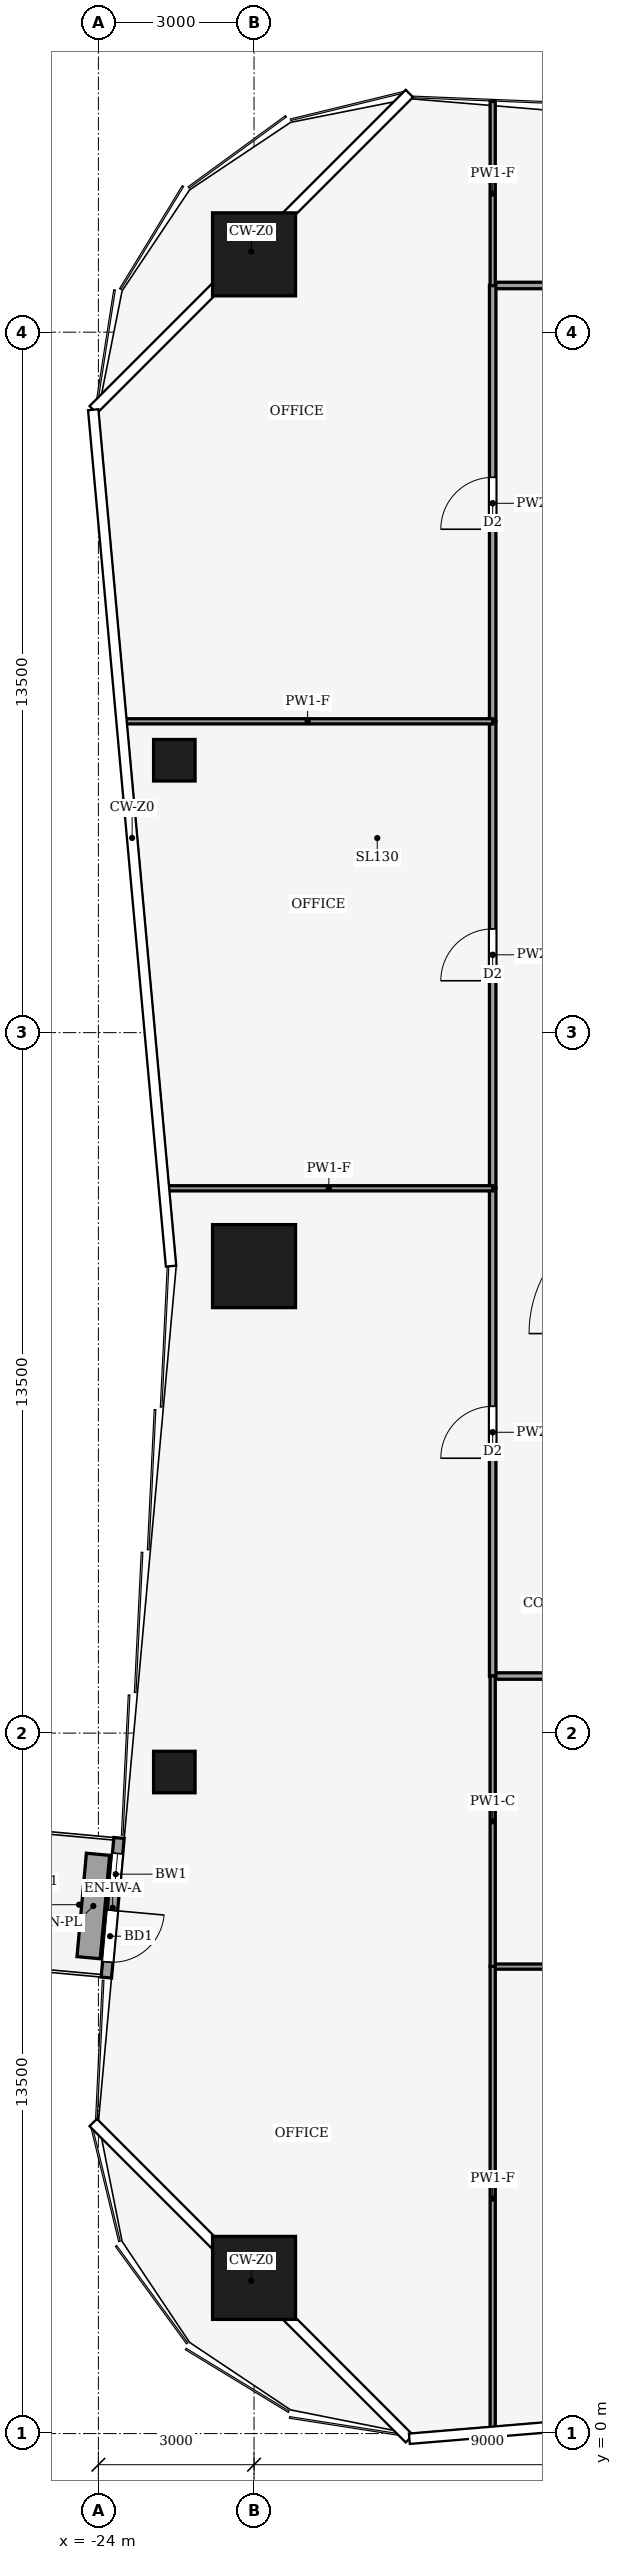
"""IFC4 building model, lengths in metres.
Left out: names, types, materials, properties, quantities, classifications, styles, units other than length and angle.
Written with IfcOpenShell. Run it as: python <this file> out.ifc"""

import sys

from ifc_helpers import new_model, si_unit, direction, frame, frame_2d, origin, origin_2d, place, context, subcontext, project, spatial, rectangle, hollow_rectangle, extrude, element, fill, save


model = new_model("IFC4")
c1 = context("Model", 3, precision=1e-05, world=origin(), true_north=direction((0.0, 1.0)))
c2 = subcontext(c1, "Body", "Model", "MODEL_VIEW")
j1 = project(units=[si_unit("LENGTHUNIT", "METRE"), si_unit("PLANEANGLEUNIT", "RADIAN")], contexts=[c1])
p1 = place(None, origin())
s1 = spatial("IfcSite", under=j1, at=p1, CompositionType="ELEMENT")
p2 = place(p1, origin())
s2 = spatial("IfcBuilding", under=s1, at=p2, CompositionType="ELEMENT")
p3 = place(p2, frame((0.0, 0.0, 46.0)))
s3 = spatial("IfcBuildingStorey", under=s2, at=p3, CompositionType="ELEMENT", Elevation=46.0)
for number, where, z_axis, x_axis in (
    (1, (-21.0, 42.0, 0.0), (0.0, 0.0, 1.0), (1.0, 0.0, 0.0)),
    (2, (-21.0, 3.0, 0.0), (0.0, 0.0, 1.0), (1.0, 0.0, 0.0)),
    (3, (-21.0, 22.5, 0.0), (0.0, 0.0, 1.0), (1.0, 0.0, 0.0)),
):
    element("IfcColumn", number, at=place(p3, frame(where, z_axis=z_axis, x_axis=x_axis)), inside=s3, PredefinedType="COLUMN", context=c2, shape_type="SweptSolid", body=[
        extrude(hollow_rectangle(XDim=1.6, YDim=1.6, WallThickness=0.09, at=origin_2d()), origin(), (0.0, 0.0, 1.0), 4.0),
    ])
for number, where, z_axis, x_axis in (
    (4, (-22.536, 12.75, 0.0), (0.0, 0.0, 1.0), (1.0, 0.0, 0.0)),
    (5, (-22.536, 32.25, 0.0), (0.0, 0.0, 1.0), (1.0, 0.0, 0.0)),
):
    element("IfcColumn", number, at=place(p3, frame(where, z_axis=z_axis, x_axis=x_axis)), inside=s3, PredefinedType="COLUMN", context=c2, shape_type="SweptSolid", body=[
        extrude(hollow_rectangle(XDim=0.8, YDim=0.8, WallThickness=0.04, at=origin_2d()), origin(), (0.0, 0.0, 1.0), 4.0),
    ])
p4 = place(p3, frame((-23.602, 11.479, 0.0), z_axis=(0.0, 0.0, 1.0), x_axis=(-0.090552042494, -0.995891724838, 0.0)))
e6 = element("IfcWall", 6, at=p4, inside=s3, PredefinedType="SOLIDWALL", context=c2, shape_type="SweptSolid", body=[
    extrude(rectangle(XDim=2.701, YDim=0.2, at=frame_2d((1.351, 0.0))), origin(), (0.0, 0.0, 1.0), 3.65),
])
p5 = place(p4, frame((1.401, 0.0, 0.0)))
e7 = element("IfcOpeningElement", 7, at=p5, cuts=e6, PredefinedType="OPENING", context=c2, shape_type="SweptSolid", body=[
    extrude(rectangle(XDim=1.0, YDim=2.1, at=frame_2d((0.5, 1.05))), frame((0.0, 0.11, 0.0), z_axis=(0.0, -1.0, 0.0), x_axis=(1.0, 0.0, 0.0)), (0.0, 0.0, 1.0), 0.22),
])
p6 = place(p4, frame((0.3, 0.0, 0.9)))
e8 = element("IfcOpeningElement", 8, at=p6, cuts=e6, PredefinedType="OPENING", context=c2, shape_type="SweptSolid", body=[
    extrude(rectangle(XDim=0.8, YDim=1.2, at=frame_2d((0.4, 0.6))), frame((0.0, 0.11, 0.0), z_axis=(0.0, -1.0, 0.0), x_axis=(1.0, 0.0, 0.0)), (0.0, 0.0, 1.0), 0.22),
])
p7 = place(p3, frame((-24.008, 11.165, 0.0), z_axis=(0.0, 0.0, 1.0), x_axis=(-0.090513748512, -0.995895205998, 0.0)))
e9 = element("IfcWall", 9, at=p7, inside=s3, PredefinedType="USERDEFINED", context=c2, shape_type="SweptSolid", body=[
    extrude(rectangle(XDim=2.001, YDim=0.45, at=frame_2d((1.001, 0.0))), origin(), (0.0, 0.0, 1.0), 0.4),
])
p8 = place(p3, frame((-9.0, 14.6, 0.0), z_axis=(0.0, 0.0, 1.0), x_axis=(-1.0, 0.0, 0.0)))
e10 = element("IfcWall", 10, at=p8, inside=s3, PredefinedType="PARTITIONING", context=c2, shape_type="SweptSolid", body=[
    extrude(rectangle(XDim=7.4, YDim=0.125, at=frame_2d((3.7, 0.0))), origin(), (0.0, 0.0, 1.0), 3.29),
])
p9 = place(p8, frame((3.2, 0.0, 0.0)))
e11 = element("IfcOpeningElement", 11, at=p9, cuts=e10, PredefinedType="OPENING", context=c2, shape_type="SweptSolid", body=[
    extrude(rectangle(XDim=1.0, YDim=2.1, at=frame_2d((0.5, 1.05))), frame((0.0, 0.073, 0.0), z_axis=(0.0, -1.0, 0.0), x_axis=(1.0, 0.0, 0.0)), (0.0, 0.0, 1.0), 0.145),
])
p10 = place(p3, frame((-16.4, 41.4, 0.0), z_axis=(0.0, 0.0, 1.0), x_axis=(1.0, 0.0, 0.0)))
e12 = element("IfcWall", 12, at=p10, inside=s3, PredefinedType="PARTITIONING", context=c2, shape_type="SweptSolid", body=[
    extrude(rectangle(XDim=10.4, YDim=0.125, at=frame_2d((5.2, 0.0))), origin(), (0.0, 0.0, 1.0), 3.54),
])
p11 = place(p10, frame((7.5, 0.0, 0.0)))
e13 = element("IfcOpeningElement", 13, at=p11, cuts=e12, PredefinedType="OPENING", context=c2, shape_type="SweptSolid", body=[
    extrude(rectangle(XDim=1.0, YDim=2.1, at=frame_2d((0.5, 1.05))), frame((0.0, 0.073, 0.0), z_axis=(0.0, -1.0, 0.0), x_axis=(1.0, 0.0, 0.0)), (0.0, 0.0, 1.0), 0.145),
])
p12 = place(p3, frame((-16.4, 14.596, 0.0), z_axis=(0.0, 0.0, 1.0), x_axis=(0.0, 1.0, 0.0)))
e14 = element("IfcWall", 14, at=p12, inside=s3, PredefinedType="PARTITIONING", context=c2, shape_type="SweptSolid", body=[
    extrude(rectangle(XDim=9.404, YDim=0.125, at=frame_2d((4.702, 0.0))), origin(), (0.0, 0.0, 1.0), 3.14),
])
p13 = place(p12, frame((4.202, 0.0, 0.0)))
e15 = element("IfcOpeningElement", 15, at=p13, cuts=e14, PredefinedType="OPENING", context=c2, shape_type="SweptSolid", body=[
    extrude(rectangle(XDim=1.0, YDim=2.1, at=frame_2d((0.5, 1.05))), frame((0.0, 0.073, 0.0), z_axis=(0.0, -1.0, 0.0), x_axis=(1.0, 0.0, 0.0)), (0.0, 0.0, 1.0), 0.145),
])
p14 = place(p3, frame((-16.4, 24.0, 0.0), z_axis=(0.0, 0.0, 1.0), x_axis=(0.0, 1.0, 0.0)))
e16 = element("IfcWall", 16, at=p14, inside=s3, PredefinedType="PARTITIONING", context=c2, shape_type="SweptSolid", body=[
    extrude(rectangle(XDim=9.0, YDim=0.125, at=frame_2d((4.5, 0.0))), origin(), (0.0, 0.0, 1.0), 3.48),
])
p15 = place(p14, frame((4.0, 0.0, 0.0)))
e17 = element("IfcOpeningElement", 17, at=p15, cuts=e16, PredefinedType="OPENING", context=c2, shape_type="SweptSolid", body=[
    extrude(rectangle(XDim=1.0, YDim=2.1, at=frame_2d((0.5, 1.05))), frame((0.0, 0.073, 0.0), z_axis=(0.0, -1.0, 0.0), x_axis=(1.0, 0.0, 0.0)), (0.0, 0.0, 1.0), 0.145),
])
p16 = place(p3, frame((-16.4, 33.0, 0.0), z_axis=(0.0, 0.0, 1.0), x_axis=(0.0, 1.0, 0.0)))
e18 = element("IfcWall", 18, at=p16, inside=s3, PredefinedType="PARTITIONING", context=c2, shape_type="SweptSolid", body=[
    extrude(rectangle(XDim=8.404, YDim=0.125, at=frame_2d((4.202, 0.0))), origin(), (0.0, 0.0, 1.0), 3.14),
])
p17 = place(p16, frame((3.702, 0.0, 0.0)))
e19 = element("IfcOpeningElement", 19, at=p17, cuts=e18, PredefinedType="OPENING", context=c2, shape_type="SweptSolid", body=[
    extrude(rectangle(XDim=1.0, YDim=2.1, at=frame_2d((0.5, 1.05))), frame((0.0, 0.073, 0.0), z_axis=(0.0, -1.0, 0.0), x_axis=(1.0, 0.0, 0.0)), (0.0, 0.0, 1.0), 0.145),
])
p18 = place(p3, frame((-8.996, 9.0, 0.0), z_axis=(0.0, 0.0, 1.0), x_axis=(-1.0, 0.0, 0.0)))
e20 = element("IfcWall", 20, at=p18, inside=s3, PredefinedType="PARTITIONING", context=c2, shape_type="SweptSolid", body=[
    extrude(rectangle(XDim=7.404, YDim=0.1, at=frame_2d((3.702, 0.0))), origin(), (0.0, 0.0, 1.0), 3.29),
])
p19 = place(p18, frame((3.202, 0.0, 0.0)))
e21 = element("IfcOpeningElement", 21, at=p19, cuts=e20, PredefinedType="OPENING", context=c2, shape_type="SweptSolid", body=[
    extrude(rectangle(XDim=1.0, YDim=2.1, at=frame_2d((0.5, 1.05))), frame((0.0, 0.06, 0.0), z_axis=(0.0, -1.0, 0.0), x_axis=(1.0, 0.0, 0.0)), (0.0, 0.0, 1.0), 0.12),
])
p20 = place(p3, frame((-16.4, 14.604, 0.0), z_axis=(0.0, 0.0, 1.0), x_axis=(0.0, -1.0, 0.0)))
e22 = element("IfcWall", 22, at=p20, inside=s3, PredefinedType="PARTITIONING", context=c2, shape_type="SweptSolid", body=[
    extrude(rectangle(XDim=5.608, YDim=0.1, at=frame_2d((2.804, 0.0))), origin(), (0.0, 0.0, 1.0), 3.87),
])
p21 = place(p3, frame((-16.4, 9.004, 0.0), z_axis=(0.0, 0.0, 1.0), x_axis=(0.0, -1.0, 0.0)))
e23 = element("IfcWall", 23, at=p21, inside=s3, PredefinedType="PARTITIONING", context=c2, shape_type="SweptSolid", body=[
    extrude(rectangle(XDim=8.951, YDim=0.1, at=frame_2d((4.475, 0.0))), origin(), (0.0, 0.0, 1.0), 3.04),
])
p22 = place(p3, frame((-16.4, 44.947, 0.0), z_axis=(0.0, 0.0, 1.0), x_axis=(0.0, -1.0, 0.0)))
e24 = element("IfcWall", 24, at=p22, inside=s3, PredefinedType="PARTITIONING", context=c2, shape_type="SweptSolid", body=[
    extrude(rectangle(XDim=3.551, YDim=0.1, at=frame_2d((1.775, 0.0))), origin(), (0.0, 0.0, 1.0), 3.04),
])
p23 = place(p3, frame((-16.4, 24.0, 0.0), z_axis=(0.0, 0.0, 1.0), x_axis=(-1.0, 0.0, 0.0)))
e25 = element("IfcWall", 25, at=p23, inside=s3, PredefinedType="PARTITIONING", context=c2, shape_type="SweptSolid", body=[
    extrude(rectangle(XDim=6.316, YDim=0.1, at=frame_2d((3.158, 0.0))), origin(), (0.0, 0.0, 1.0), 3.04),
])
p24 = place(p3, frame((-16.4, 33.0, 0.0), z_axis=(0.0, 0.0, 1.0), x_axis=(-1.0, 0.0, 0.0)))
e26 = element("IfcWall", 26, at=p24, inside=s3, PredefinedType="PARTITIONING", context=c2, shape_type="SweptSolid", body=[
    extrude(rectangle(XDim=7.135, YDim=0.1, at=frame_2d((3.567, 0.0))), origin(), (0.0, 0.0, 1.0), 3.04),
])
p25 = place(p5, origin())
e27 = element("IfcDoor", 27, at=p25, inside=s3, OperationType="SINGLE_SWING_RIGHT", PredefinedType="DOOR", context=c2, shape_type="SweptSolid", body=[
    extrude(rectangle(XDim=1.0, YDim=2.1, at=frame_2d((0.5, 1.05))), frame((0.0, 0.025, 0.0), z_axis=(0.0, -1.0, 0.0), x_axis=(1.0, 0.0, 0.0)), (0.0, 0.0, 1.0), 0.05),
])
fill(e7, e27)
p26 = place(p6, origin())
e28 = element("IfcWindow", 28, at=p26, inside=s3, PartitioningType="SINGLE_PANEL", PredefinedType="WINDOW", context=c2, shape_type="SweptSolid", body=[
    extrude(rectangle(XDim=0.8, YDim=1.2, at=frame_2d((0.4, 0.6))), frame((0.0, 0.03, 0.0), z_axis=(0.0, -1.0, 0.0), x_axis=(1.0, 0.0, 0.0)), (0.0, 0.0, 1.0), 0.06),
])
fill(e8, e28)
p27 = place(p13, origin())
e29 = element("IfcDoor", 29, at=p27, inside=s3, OperationType="SINGLE_SWING_LEFT", PredefinedType="DOOR", context=c2, shape_type="SweptSolid", body=[
    extrude(rectangle(XDim=1.0, YDim=2.1, at=frame_2d((0.5, 1.05))), frame((0.0, 0.025, 0.0), z_axis=(0.0, -1.0, 0.0), x_axis=(1.0, 0.0, 0.0)), (0.0, 0.0, 1.0), 0.05),
])
fill(e15, e29)
p28 = place(p15, origin())
e30 = element("IfcDoor", 30, at=p28, inside=s3, OperationType="SINGLE_SWING_RIGHT", PredefinedType="DOOR", context=c2, shape_type="SweptSolid", body=[
    extrude(rectangle(XDim=1.0, YDim=2.1, at=frame_2d((0.5, 1.05))), frame((0.0, 0.025, 0.0), z_axis=(0.0, -1.0, 0.0), x_axis=(1.0, 0.0, 0.0)), (0.0, 0.0, 1.0), 0.05),
])
fill(e17, e30)
p29 = place(p17, origin())
e31 = element("IfcDoor", 31, at=p29, inside=s3, OperationType="SINGLE_SWING_LEFT", PredefinedType="DOOR", context=c2, shape_type="SweptSolid", body=[
    extrude(rectangle(XDim=1.0, YDim=2.1, at=frame_2d((0.5, 1.05))), frame((0.0, 0.025, 0.0), z_axis=(0.0, -1.0, 0.0), x_axis=(1.0, 0.0, 0.0)), (0.0, 0.0, 1.0), 0.05),
])
fill(e19, e31)
save(model, sys.argv[1])
